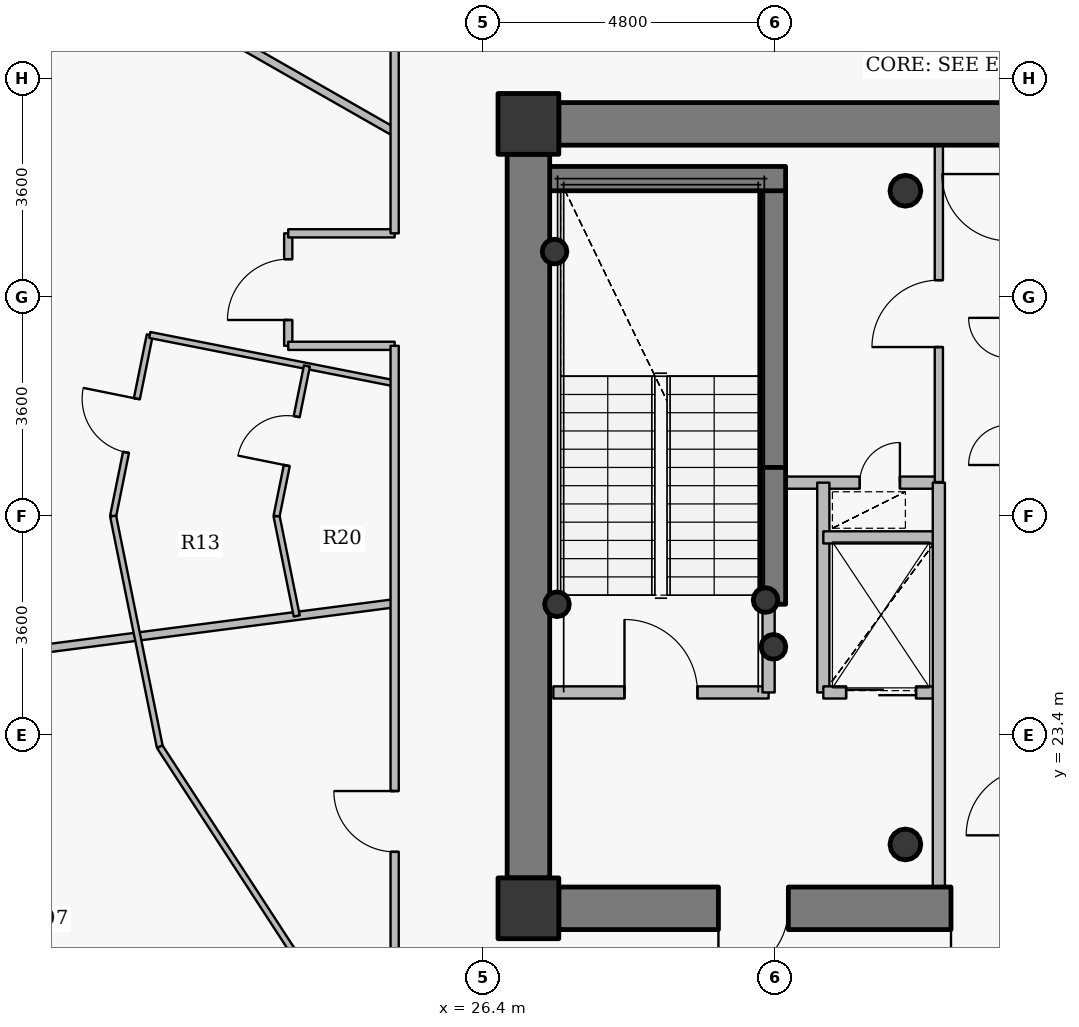
"""IFC4 building model, lengths in metres.
Left out: names, types, materials, properties, quantities, classifications, styles, units other than length and angle.
Written with IfcOpenShell. Run it as: python <this file> out.ifc"""

import sys

from ifc_helpers import new_model, si_unit, direction, frame, frame_2d, origin, origin_2d, place, context, subcontext, project, spatial, rectangle, hollow_circle, extrude, source, transform, mapped, element, fill, save


model = new_model("IFC4")
c1 = context("Model", 3, precision=1e-05, world=origin(), true_north=direction((0.0, 1.0)))
c2 = subcontext(c1, "Body", "Model", "MODEL_VIEW")
j1 = project(units=[si_unit("LENGTHUNIT", "METRE"), si_unit("PLANEANGLEUNIT", "RADIAN")], contexts=[c1])
p1 = place(None, origin())
s1 = spatial("IfcSite", under=j1, at=p1, CompositionType="ELEMENT")
p2 = place(p1, origin())
s2 = spatial("IfcBuilding", under=s1, at=p2, CompositionType="ELEMENT")
p3 = place(p2, frame((0.0, 0.0, 295.5)))
s3 = spatial("IfcBuildingStorey", under=s2, at=p3, CompositionType="ELEMENT", Elevation=295.5)
for number, where, z_axis, x_axis in (
    (1, (27.15, 20.55, 0.0), (0.0, 0.0, 1.0), (1.0, 0.0, 0.0)),
    (2, (27.15, 33.45, 0.0), (0.0, 0.0, 1.0), (1.0, 0.0, 0.0)),
):
    element("IfcColumn", number, at=place(p3, frame(where, z_axis=z_axis, x_axis=x_axis)), inside=s3, PredefinedType="COLUMN", context=c2, shape_type="SweptSolid", body=[
        extrude(rectangle(XDim=1.0, YDim=1.0, at=origin_2d()), origin(), (0.0, 0.0, 1.0), 3.75),
    ])
for number, where, z_axis, x_axis in (
    (3, (33.35, 21.6, 0.0), (0.0, 0.0, 1.0), (1.0, 0.0, 0.0)),
    (4, (33.35, 32.35, 0.0), (0.0, 0.0, 1.0), (1.0, 0.0, 0.0)),
):
    element("IfcColumn", number, at=place(p3, frame(where, z_axis=z_axis, x_axis=x_axis)), inside=s3, PredefinedType="COLUMN", context=c2, shape_type="SweptSolid", body=[
        extrude(hollow_circle(Radius=0.254, WallThickness=0.02, at=origin_2d()), origin(), (0.0, 0.0, 1.0), 3.75),
    ])
p4 = place(p3, frame((31.18, 27.8, 0.0), z_axis=(0.0, 0.0, 1.0), x_axis=(0.0, 1.0, 0.0)))
e5 = element("IfcWall", 5, at=p4, inside=s3, PredefinedType="SHEAR", context=c2, shape_type="SweptSolid", body=[
    extrude(rectangle(XDim=4.75, YDim=0.4, at=frame_2d((2.375, 0.0))), origin(), (0.0, 0.0, 1.0), 3.75),
])
p5 = place(p3, frame((27.25, 32.55, 0.0), z_axis=(0.0, 0.0, 1.0), x_axis=(1.0, 0.0, 0.0)))
e6 = element("IfcWall", 6, at=p5, inside=s3, PredefinedType="SHEAR", context=c2, shape_type="SweptSolid", body=[
    extrude(rectangle(XDim=4.13, YDim=0.4, at=frame_2d((2.065, 0.0))), origin(), (0.0, 0.0, 1.0), 3.75),
])
for number, where, z_axis, x_axis in (
    (7, (27.58, 31.35, 0.0), (0.0, 0.0, 1.0), (1.0, 0.0, 0.0)),
    (8, (31.05, 25.62, 0.0), (0.0, 0.0, 1.0), (1.0, 0.0, 0.0)),
    (9, (31.18, 24.85, 0.0), (0.0, 0.0, 1.0), (1.0, 0.0, 0.0)),
    (10, (27.62, 25.55, 0.0), (0.0, 0.0, 1.0), (1.0, 0.0, 0.0)),
):
    element("IfcColumn", number, at=place(p3, frame(where, z_axis=z_axis, x_axis=x_axis)), inside=s3, PredefinedType="COLUMN", context=c2, shape_type="SweptSolid", body=[
        extrude(hollow_circle(Radius=0.203, WallThickness=0.016, at=origin_2d()), origin(), (0.0, 0.0, 1.0), 3.75),
    ])
p6 = place(p3, frame((27.65, 33.45, 0.0), z_axis=(0.0, 0.0, 1.0), x_axis=(1.0, 0.0, 0.0)))
e11 = element("IfcWall", 11, at=p6, inside=s3, PredefinedType="SHEAR", context=c2, shape_type="SweptSolid", body=[
    extrude(rectangle(XDim=16.7, YDim=0.7, at=frame_2d((8.35, 0.0))), origin(), (0.0, 0.0, 1.0), 3.05),
])
p7 = place(p6, frame((12.775, 0.0, 0.0)))
e12 = element("IfcOpeningElement", 12, at=p7, cuts=e11, PredefinedType="OPENING", context=c2, shape_type="SweptSolid", body=[
    extrude(rectangle(XDim=1.15, YDim=2.15, at=origin_2d()), frame((0.575, 0.36, 1.075), z_axis=(0.0, -1.0, 0.0), x_axis=(1.0, 0.0, 0.0)), (0.0, 0.0, 1.0), 0.72),
])
p8 = place(p3, frame((44.35, 20.55, 0.0), z_axis=(0.0, 0.0, 1.0), x_axis=(-1.0, 0.0, 0.0)))
e13 = element("IfcWall", 13, at=p8, inside=s3, PredefinedType="SHEAR", context=c2, shape_type="SweptSolid", body=[
    extrude(rectangle(XDim=16.7, YDim=0.7, at=frame_2d((8.35, 0.0))), origin(), (0.0, 0.0, 1.0), 3.05),
])
p9 = place(p8, frame((12.925, 0.0, 0.0)))
e14 = element("IfcOpeningElement", 14, at=p9, cuts=e13, PredefinedType="OPENING", context=c2, shape_type="SweptSolid", body=[
    extrude(rectangle(XDim=1.15, YDim=2.15, at=origin_2d()), frame((0.575, 0.36, 1.075), z_axis=(0.0, -1.0, 0.0), x_axis=(1.0, 0.0, 0.0)), (0.0, 0.0, 1.0), 0.72),
])
p10 = place(p8, frame((9.1, 0.0, 0.0)))
e15 = element("IfcOpeningElement", 15, at=p10, cuts=e13, PredefinedType="OPENING", context=c2, shape_type="SweptSolid", body=[
    extrude(rectangle(XDim=1.15, YDim=2.15, at=origin_2d()), frame((0.575, 0.36, 1.075), z_axis=(0.0, -1.0, 0.0), x_axis=(1.0, 0.0, 0.0)), (0.0, 0.0, 1.0), 0.72),
])
p11 = place(p3, frame((27.15, 21.05, 0.0), z_axis=(0.0, 0.0, 1.0), x_axis=(0.0, 1.0, 0.0)))
e16 = element("IfcWall", 16, at=p11, inside=s3, PredefinedType="SHEAR", context=c2, shape_type="SweptSolid", body=[
    extrude(rectangle(XDim=11.9, YDim=0.7, at=frame_2d((5.95, 0.0))), origin(), (0.0, 0.0, 1.0), 3.05),
])
p12 = place(p3, frame((31.18, 25.55, 0.0), z_axis=(0.0, 0.0, 1.0), x_axis=(0.0, 1.0, 0.0)))
e17 = element("IfcWall", 17, at=p12, inside=s3, PredefinedType="SHEAR", context=c2, shape_type="SweptSolid", body=[
    extrude(rectangle(XDim=2.25, YDim=0.4, at=frame_2d((1.125, 0.0))), origin(), (0.0, 0.0, 1.0), 3.1),
])
p13 = place(p3, frame((14.033, 24.151, 0.0), z_axis=(0.0, 0.0, 1.0), x_axis=(0.99169266035, 0.128629963101, 0.0)))
e18 = element("IfcWall", 18, at=p13, inside=s3, PredefinedType="PARTITIONING", context=c2, shape_type="SweptSolid", body=[
    extrude(rectangle(XDim=11.009, YDim=0.135, at=frame_2d((5.504, 0.0))), origin(), (0.0, 0.0, 1.0), 2.985),
])
p14 = place(p3, frame((18.016, 37.274, 0.0), z_axis=(0.0, 0.0, 1.0), x_axis=(0.868277005727, -0.496079672357, 0.0)))
e19 = element("IfcWall", 19, at=p14, inside=s3, PredefinedType="PARTITIONING", context=c2, shape_type="SweptSolid", body=[
    extrude(rectangle(XDim=7.985, YDim=0.135, at=frame_2d((3.993, 0.0))), origin(), (0.0, 0.0, 1.0), 2.985),
])
p15 = place(p3, frame((20.32, 27.0, 0.0), z_axis=(0.0, 0.0, 1.0), x_axis=(0.198201469781, 0.980161301713, 0.0)))
e20 = element("IfcWall", 20, at=p15, inside=s3, PredefinedType="PARTITIONING", context=c2, shape_type="SweptSolid", body=[
    extrude(rectangle(XDim=3.039, YDim=0.1, at=frame_2d((1.52, 0.0))), origin(), (0.0, 0.0, 1.0), 3.035),
])
p16 = place(p15, frame((1.069, 0.0, 0.0)))
e21 = element("IfcOpeningElement", 21, at=p16, cuts=e20, PredefinedType="OPENING", context=c2, shape_type="SweptSolid", body=[
    extrude(rectangle(XDim=0.9, YDim=2.1, at=origin_2d()), frame((0.45, 0.06, 1.05), z_axis=(0.0, -1.0, 0.0), x_axis=(1.0, 0.0, 0.0)), (0.0, 0.0, 1.0), 0.12),
])
p17 = place(p3, frame((20.32, 27.0, 0.0), z_axis=(0.0, 0.0, 1.0), x_axis=(0.198226068862, -0.980156327135, 0.0)))
e22 = element("IfcWall", 22, at=p17, inside=s3, PredefinedType="PARTITIONING", context=c2, shape_type="SweptSolid", body=[
    extrude(rectangle(XDim=3.871, YDim=0.1, at=frame_2d((1.936, 0.0))), origin(), (0.0, 0.0, 1.0), 3.035),
])
p18 = place(p3, frame((20.922, 29.979, 0.0), z_axis=(0.0, 0.0, 1.0), x_axis=(0.981042206934, -0.19379419035, 0.0)))
e23 = element("IfcWall", 23, at=p18, inside=s3, PredefinedType="PARTITIONING", context=c2, shape_type="SweptSolid", body=[
    extrude(rectangle(XDim=4.106, YDim=0.1, at=frame_2d((2.053, 0.0))), origin(), (0.0, 0.0, 1.0), 3.5),
])
p19 = place(p3, frame((21.087, 23.206, 0.0), z_axis=(0.0, 0.0, 1.0), x_axis=(0.545435886628, -0.838152547916, 0.0)))
e24 = element("IfcWall", 24, at=p19, inside=s3, PredefinedType="PARTITIONING", context=c2, shape_type="SweptSolid", body=[
    extrude(rectangle(XDim=4.083, YDim=0.1, at=frame_2d((2.042, 0.0))), origin(), (0.0, 0.0, 1.0), 3.035),
])
p20 = place(p3, frame((23.008, 27.0, 0.0), z_axis=(0.0, 0.0, 1.0), x_axis=(0.198189512146, -0.980163719628, 0.0)))
e25 = element("IfcWall", 25, at=p20, inside=s3, PredefinedType="PARTITIONING", context=c2, shape_type="SweptSolid", body=[
    extrude(rectangle(XDim=1.675, YDim=0.1, at=frame_2d((0.838, 0.0))), origin(), (0.0, 0.0, 1.0), 3.035),
])
p21 = place(p3, frame((23.008, 27.0, 0.0), z_axis=(0.0, 0.0, 1.0), x_axis=(0.19818541272, 0.980164548525, 0.0)))
e26 = element("IfcWall", 26, at=p21, inside=s3, PredefinedType="PARTITIONING", context=c2, shape_type="SweptSolid", body=[
    extrude(rectangle(XDim=2.518, YDim=0.1, at=frame_2d((1.259, 0.0))), origin(), (0.0, 0.0, 1.0), 3.035),
])
p22 = place(p21, frame((0.849, 0.0, 0.0)))
e27 = element("IfcOpeningElement", 27, at=p22, cuts=e26, PredefinedType="OPENING", context=c2, shape_type="SweptSolid", body=[
    extrude(rectangle(XDim=0.82, YDim=2.1, at=origin_2d()), frame((0.41, 0.06, 1.05), z_axis=(0.0, -1.0, 0.0), x_axis=(1.0, 0.0, 0.0)), (0.0, 0.0, 1.0), 0.12),
])
p23 = place(p3, frame((23.2, 29.8, 0.0), z_axis=(0.0, 0.0, 1.0), x_axis=(0.0, 1.0, 0.0)))
e28 = element("IfcWall", 28, at=p23, inside=s3, PredefinedType="PARTITIONING", context=c2, shape_type="SweptSolid", body=[
    extrude(rectangle(XDim=1.85, YDim=0.135, at=frame_2d((0.925, 0.0))), origin(), (0.0, 0.0, 1.0), 3.5),
])
p24 = place(p23, frame((0.425, 0.0, 0.0)))
e29 = element("IfcOpeningElement", 29, at=p24, cuts=e28, PredefinedType="OPENING", context=c2, shape_type="SweptSolid", body=[
    extrude(rectangle(XDim=1.0, YDim=2.15, at=origin_2d()), frame((0.5, 0.078, 1.075), z_axis=(0.0, -1.0, 0.0), x_axis=(1.0, 0.0, 0.0)), (0.0, 0.0, 1.0), 0.155),
])
p25 = place(p3, frame((23.2, 29.8, 0.0), z_axis=(0.0, 0.0, 1.0), x_axis=(1.0, 0.0, 0.0)))
e30 = element("IfcWall", 30, at=p25, inside=s3, PredefinedType="PARTITIONING", context=c2, shape_type="SweptSolid", body=[
    extrude(rectangle(XDim=1.75, YDim=0.135, at=frame_2d((0.875, 0.0))), origin(), (0.0, 0.0, 1.0), 3.5),
])
p26 = place(p3, frame((23.2, 31.65, 0.0), z_axis=(0.0, 0.0, 1.0), x_axis=(1.0, 0.0, 0.0)))
e31 = element("IfcWall", 31, at=p26, inside=s3, PredefinedType="PARTITIONING", context=c2, shape_type="SweptSolid", body=[
    extrude(rectangle(XDim=1.75, YDim=0.135, at=frame_2d((0.875, 0.0))), origin(), (0.0, 0.0, 1.0), 3.035),
])
p27 = place(p3, frame((24.95, 18.35, 0.0), z_axis=(0.0, 0.0, 1.0), x_axis=(0.0, 1.0, 0.0)))
e32 = element("IfcWall", 32, at=p27, inside=s3, PredefinedType="PARTITIONING", context=c2, shape_type="SweptSolid", body=[
    extrude(rectangle(XDim=11.45, YDim=0.135, at=frame_2d((5.725, 0.0))), origin(), (0.0, 0.0, 1.0), 3.035),
])
p28 = place(p27, frame((3.128, 0.0, 0.0)))
e33 = element("IfcOpeningElement", 33, at=p28, cuts=e32, PredefinedType="OPENING", context=c2, shape_type="SweptSolid", body=[
    extrude(rectangle(XDim=1.0, YDim=2.15, at=origin_2d()), frame((0.5, 0.078, 1.075), z_axis=(0.0, -1.0, 0.0), x_axis=(1.0, 0.0, 0.0)), (0.0, 0.0, 1.0), 0.155),
])
p29 = place(p3, frame((24.95, 31.65, 0.0), z_axis=(0.0, 0.0, 1.0), x_axis=(0.0, 1.0, 0.0)))
e34 = element("IfcWall", 34, at=p29, inside=s3, PredefinedType="PARTITIONING", context=c2, shape_type="SweptSolid", body=[
    extrude(rectangle(XDim=4.0, YDim=0.135, at=frame_2d((2.0, 0.0))), origin(), (0.0, 0.0, 1.0), 3.035),
])
p30 = place(p3, frame((27.56, 24.1, 0.0), z_axis=(0.0, 0.0, 1.0), x_axis=(1.0, 0.0, 0.0)))
e35 = element("IfcWall", 35, at=p30, inside=s3, PredefinedType="PARTITIONING", context=c2, shape_type="SweptSolid", body=[
    extrude(rectangle(XDim=3.54, YDim=0.2, at=frame_2d((1.77, 0.0))), origin(), (0.0, 0.0, 1.0), 3.5),
])
p31 = place(p30, frame((1.17, 0.0, 0.0)))
e36 = element("IfcOpeningElement", 36, at=p31, cuts=e35, PredefinedType="OPENING", context=c2, shape_type="SweptSolid", body=[
    extrude(rectangle(XDim=1.2, YDim=2.15, at=origin_2d()), frame((0.6, 0.11, 1.075), z_axis=(0.0, -1.0, 0.0), x_axis=(1.0, 0.0, 0.0)), (0.0, 0.0, 1.0), 0.22),
])
p32 = place(p3, frame((31.1, 24.1, 0.0), z_axis=(0.0, 0.0, 1.0), x_axis=(0.0, 1.0, 0.0)))
e37 = element("IfcWall", 37, at=p32, inside=s3, PredefinedType="PARTITIONING", context=c2, shape_type="SweptSolid", body=[
    extrude(rectangle(XDim=1.44, YDim=0.2, at=frame_2d((0.72, 0.0))), origin(), (0.0, 0.0, 1.0), 3.5),
])
p33 = place(p3, frame((31.1, 27.55, 0.0), z_axis=(0.0, 0.0, 1.0), x_axis=(1.0, 0.0, 0.0)))
e38 = element("IfcWall", 38, at=p33, inside=s3, PredefinedType="PARTITIONING", context=c2, shape_type="SweptSolid", body=[
    extrude(rectangle(XDim=2.8, YDim=0.2, at=frame_2d((1.4, 0.0))), origin(), (0.0, 0.0, 1.0), 3.085),
])
p34 = place(p33, frame((1.5, 0.0, 0.0)))
e39 = element("IfcOpeningElement", 39, at=p34, cuts=e38, PredefinedType="OPENING", context=c2, shape_type="SweptSolid", body=[
    extrude(rectangle(XDim=0.66, YDim=2.05, at=origin_2d()), frame((0.33, 0.11, 1.025), z_axis=(0.0, -1.0, 0.0), x_axis=(1.0, 0.0, 0.0)), (0.0, 0.0, 1.0), 0.22),
])
p35 = place(p3, frame((32.0, 24.1, 0.0), z_axis=(0.0, 0.0, 1.0), x_axis=(0.0, 1.0, 0.0)))
e40 = element("IfcWall", 40, at=p35, inside=s3, PredefinedType="PARTITIONING", context=c2, shape_type="SweptSolid", body=[
    extrude(rectangle(XDim=3.45, YDim=0.2, at=frame_2d((1.725, 0.0))), origin(), (0.0, 0.0, 1.0), 3.5),
])
p36 = place(p3, frame((32.0, 24.1, 0.0), z_axis=(0.0, 0.0, 1.0), x_axis=(1.0, 0.0, 0.0)))
e41 = element("IfcWall", 41, at=p36, inside=s3, PredefinedType="PARTITIONING", context=c2, shape_type="SweptSolid", body=[
    extrude(rectangle(XDim=1.9, YDim=0.2, at=frame_2d((0.95, 0.0))), origin(), (0.0, 0.0, 1.0), 3.085),
])
p37 = place(p36, frame((0.375, 0.0, 0.0)))
e42 = element("IfcOpeningElement", 42, at=p37, cuts=e41, PredefinedType="OPENING", context=c2, shape_type="SweptSolid", body=[
    extrude(rectangle(XDim=1.15, YDim=2.15, at=origin_2d()), frame((0.575, 0.11, 1.075), z_axis=(0.0, -1.0, 0.0), x_axis=(1.0, 0.0, 0.0)), (0.0, 0.0, 1.0), 0.22),
])
p38 = place(p3, frame((32.0, 26.65, 0.0), z_axis=(0.0, 0.0, 1.0), x_axis=(1.0, 0.0, 0.0)))
e43 = element("IfcWall", 43, at=p38, inside=s3, PredefinedType="PARTITIONING", context=c2, shape_type="SweptSolid", body=[
    extrude(rectangle(XDim=1.9, YDim=0.2, at=frame_2d((0.95, 0.0))), origin(), (0.0, 0.0, 1.0), 3.085),
])
p39 = place(p3, frame((33.9, 20.9, 0.0), z_axis=(0.0, 0.0, 1.0), x_axis=(0.0, 1.0, 0.0)))
e44 = element("IfcWall", 44, at=p39, inside=s3, PredefinedType="PARTITIONING", context=c2, shape_type="SweptSolid", body=[
    extrude(rectangle(XDim=6.65, YDim=0.2, at=frame_2d((3.325, 0.0))), origin(), (0.0, 0.0, 1.0), 3.085),
])
p40 = place(p3, frame((33.9, 27.56, 0.0), z_axis=(0.0, 0.0, 1.0), x_axis=(0.0, 1.0, 0.0)))
e45 = element("IfcWall", 45, at=p40, inside=s3, PredefinedType="PARTITIONING", context=c2, shape_type="SweptSolid", body=[
    extrude(rectangle(XDim=5.54, YDim=0.135, at=frame_2d((2.77, 0.0))), origin(), (0.0, 0.0, 1.0), 3.085),
])
p41 = place(p40, frame((2.22, 0.0, 0.0)))
e46 = element("IfcOpeningElement", 46, at=p41, cuts=e45, PredefinedType="OPENING", context=c2, shape_type="SweptSolid", body=[
    extrude(rectangle(XDim=1.1, YDim=2.15, at=origin_2d()), frame((0.55, 0.078, 1.075), z_axis=(0.0, -1.0, 0.0), x_axis=(1.0, 0.0, 0.0)), (0.0, 0.0, 1.0), 0.155),
])
p42 = place(p3, frame((27.64, 33.8, 0.0), z_axis=(0.0, 0.0, 1.0), x_axis=(-1.0, 0.0, 0.0)))
e47 = element("IfcWall", 47, at=p42, inside=s3, PredefinedType="PARTITIONING", context=c2, shape_type="SweptSolid", body=[
    extrude(rectangle(XDim=0.84, YDim=0.135, at=frame_2d((0.42, 0.0))), origin(), (0.0, 0.0, 1.0), 3.035),
])
p43 = place(p3, frame((26.8, 33.492, 0.0), z_axis=(0.0, 0.0, 1.0), x_axis=(0.0, -1.0, 0.0)))
e48 = element("IfcWall", 48, at=p43, inside=s3, PredefinedType="PARTITIONING", context=c2, shape_type="SweptSolid", body=[
    extrude(rectangle(XDim=0.532, YDim=0.135, at=frame_2d((0.266, 0.0))), origin(), (0.0, 0.0, 1.0), 3.5),
])
p44 = place(p3, frame((26.8, 21.04, 0.0), z_axis=(0.0, 0.0, 1.0), x_axis=(0.0, -1.0, 0.0)))
e49 = element("IfcWall", 49, at=p44, inside=s3, PredefinedType="PARTITIONING", context=c2, shape_type="SweptSolid", body=[
    extrude(rectangle(XDim=0.84, YDim=0.135, at=frame_2d((0.42, 0.0))), origin(), (0.0, 0.0, 1.0), 3.035),
])
p45 = place(p3, frame((27.107, 20.2, 0.0), z_axis=(0.0, 0.0, 1.0), x_axis=(1.0, 0.0, 0.0)))
e50 = element("IfcWall", 50, at=p45, inside=s3, PredefinedType="PARTITIONING", context=c2, shape_type="SweptSolid", body=[
    extrude(rectangle(XDim=0.532, YDim=0.135, at=frame_2d((0.266, 0.0))), origin(), (0.0, 0.0, 1.0), 3.035),
])
m1 = source(origin(), c2, "Body", "SweptSolid", [
    extrude(rectangle(XDim=1.15, YDim=2.15, at=origin_2d()), frame((0.575, 0.025, 1.075), z_axis=(0.0, -1.0, 0.0), x_axis=(1.0, 0.0, 0.0)), (0.0, 0.0, 1.0), 0.05),
])
p46 = place(p9, origin())
e51 = element("IfcDoor", 51, at=p46, inside=s3, OperationType="SINGLE_SWING_RIGHT", PredefinedType="DOOR", context=c2, shape_type="MappedRepresentation", body=[
    mapped(m1, transform((0.0, 0.0, 0.0), x_axis=(1.0, 0.0, 0.0), y_axis=(0.0, 1.0, 0.0), z_axis=(0.0, 0.0, 1.0), scale=1.0)),
])
fill(e14, e51)
p47 = place(p10, origin())
e52 = element("IfcDoor", 52, at=p47, inside=s3, OperationType="SINGLE_SWING_RIGHT", PredefinedType="DOOR", context=c2, shape_type="MappedRepresentation", body=[
    mapped(m1, transform((0.0, 0.0, 0.0), x_axis=(1.0, 0.0, 0.0), y_axis=(0.0, 1.0, 0.0), z_axis=(0.0, 0.0, 1.0), scale=1.0)),
])
fill(e15, e52)
m2 = source(origin(), c2, "Body", "SweptSolid", [
    extrude(rectangle(XDim=1.2, YDim=2.15, at=origin_2d()), frame((0.6, 0.025, 1.075), z_axis=(0.0, -1.0, 0.0), x_axis=(1.0, 0.0, 0.0)), (0.0, 0.0, 1.0), 0.05),
])
p48 = place(p31, origin())
e53 = element("IfcDoor", 53, at=p48, inside=s3, OperationType="SINGLE_SWING_LEFT", PredefinedType="DOOR", context=c2, shape_type="MappedRepresentation", body=[
    mapped(m2, transform((0.0, 0.0, 0.0), x_axis=(1.0, 0.0, 0.0), y_axis=(0.0, 1.0, 0.0), z_axis=(0.0, 0.0, 1.0), scale=1.0)),
])
fill(e36, e53)
m3 = source(origin(), c2, "Body", "SweptSolid", [
    extrude(rectangle(XDim=1.15, YDim=2.15, at=origin_2d()), frame((0.575, 0.025, 1.075), z_axis=(0.0, -1.0, 0.0), x_axis=(1.0, 0.0, 0.0)), (0.0, 0.0, 1.0), 0.05),
])
p49 = place(p37, origin())
e54 = element("IfcDoor", 54, at=p49, inside=s3, OperationType="DOUBLE_DOOR_SLIDING", PredefinedType="USERDEFINED", context=c2, shape_type="MappedRepresentation", body=[
    mapped(m3, transform((0.0, 0.0, 0.0), x_axis=(1.0, 0.0, 0.0), y_axis=(0.0, 1.0, 0.0), z_axis=(0.0, 0.0, 1.0), scale=1.0)),
])
fill(e42, e54)
m4 = source(origin(), c2, "Body", "SweptSolid", [
    extrude(rectangle(XDim=1.0, YDim=2.15, at=origin_2d()), frame((0.5, 0.025, 1.075), z_axis=(0.0, -1.0, 0.0), x_axis=(1.0, 0.0, 0.0)), (0.0, 0.0, 1.0), 0.05),
])
p50 = place(p24, origin())
e55 = element("IfcDoor", 55, at=p50, inside=s3, OperationType="SINGLE_SWING_LEFT", PredefinedType="DOOR", context=c2, shape_type="MappedRepresentation", body=[
    mapped(m4, transform((0.0, 0.0, 0.0), x_axis=(1.0, 0.0, 0.0), y_axis=(0.0, 1.0, 0.0), z_axis=(0.0, 0.0, 1.0), scale=1.0)),
])
fill(e29, e55)
m5 = source(origin(), c2, "Body", "SweptSolid", [
    extrude(rectangle(XDim=0.9, YDim=2.1, at=origin_2d()), frame((0.45, 0.025, 1.05), z_axis=(0.0, -1.0, 0.0), x_axis=(1.0, 0.0, 0.0)), (0.0, 0.0, 1.0), 0.05),
])
p51 = place(p16, origin())
e56 = element("IfcDoor", 56, at=p51, inside=s3, OperationType="SINGLE_SWING_RIGHT", PredefinedType="DOOR", context=c2, shape_type="MappedRepresentation", body=[
    mapped(m5, transform((0.0, 0.0, 0.0), x_axis=(1.0, 0.0, 0.0), y_axis=(0.0, 1.0, 0.0), z_axis=(0.0, 0.0, 1.0), scale=1.0)),
])
fill(e21, e56)
m6 = source(origin(), c2, "Body", "SweptSolid", [
    extrude(rectangle(XDim=0.82, YDim=2.1, at=origin_2d()), frame((0.41, 0.025, 1.05), z_axis=(0.0, -1.0, 0.0), x_axis=(1.0, 0.0, 0.0)), (0.0, 0.0, 1.0), 0.05),
])
p52 = place(p22, origin())
e57 = element("IfcDoor", 57, at=p52, inside=s3, OperationType="SINGLE_SWING_LEFT", PredefinedType="DOOR", context=c2, shape_type="MappedRepresentation", body=[
    mapped(m6, transform((0.0, 0.0, 0.0), x_axis=(1.0, 0.0, 0.0), y_axis=(0.0, 1.0, 0.0), z_axis=(0.0, 0.0, 1.0), scale=1.0)),
])
fill(e27, e57)
p53 = place(p28, origin())
e58 = element("IfcDoor", 58, at=p53, inside=s3, OperationType="SINGLE_SWING_RIGHT", PredefinedType="DOOR", context=c2, shape_type="MappedRepresentation", body=[
    mapped(m4, transform((0.0, 0.0, 0.0), x_axis=(1.0, 0.0, 0.0), y_axis=(0.0, 1.0, 0.0), z_axis=(0.0, 0.0, 1.0), scale=1.0)),
])
fill(e33, e58)
m7 = source(origin(), c2, "Body", "SweptSolid", [
    extrude(rectangle(XDim=1.1, YDim=2.15, at=origin_2d()), frame((0.55, 0.025, 1.075), z_axis=(0.0, -1.0, 0.0), x_axis=(1.0, 0.0, 0.0)), (0.0, 0.0, 1.0), 0.05),
])
p54 = place(p41, origin())
e59 = element("IfcDoor", 59, at=p54, inside=s3, OperationType="SINGLE_SWING_LEFT", PredefinedType="DOOR", context=c2, shape_type="MappedRepresentation", body=[
    mapped(m7, transform((0.0, 0.0, 0.0), x_axis=(1.0, 0.0, 0.0), y_axis=(0.0, 1.0, 0.0), z_axis=(0.0, 0.0, 1.0), scale=1.0)),
])
fill(e46, e59)
m8 = source(origin(), c2, "Body", "SweptSolid", [
    extrude(rectangle(XDim=0.66, YDim=2.05, at=origin_2d()), frame((0.33, 0.025, 1.025), z_axis=(0.0, -1.0, 0.0), x_axis=(1.0, 0.0, 0.0)), (0.0, 0.0, 1.0), 0.05),
])
p55 = place(p34, origin())
e60 = element("IfcDoor", 60, at=p55, inside=s3, OperationType="SINGLE_SWING_RIGHT", PredefinedType="USERDEFINED", context=c2, shape_type="MappedRepresentation", body=[
    mapped(m8, transform((0.0, 0.0, 0.0), x_axis=(1.0, 0.0, 0.0), y_axis=(0.0, 1.0, 0.0), z_axis=(0.0, 0.0, 1.0), scale=1.0)),
])
fill(e39, e60)
save(model, sys.argv[1])
